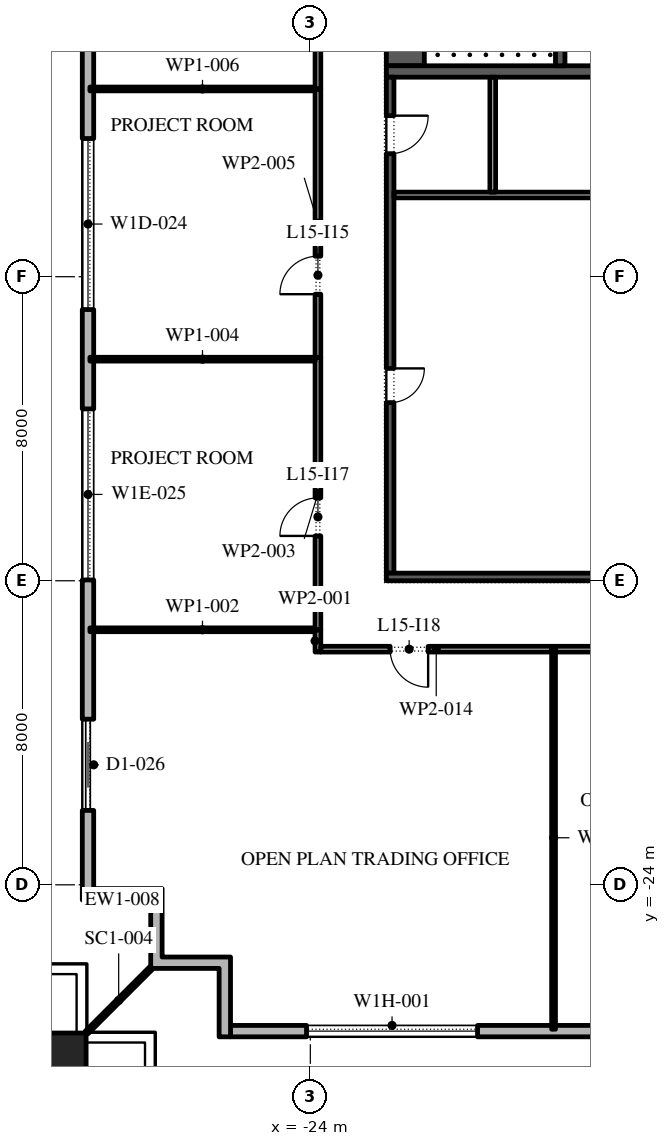
"""IFC4 building model, lengths in metres.
Left out: names, types, materials, properties, quantities, classifications, styles, units other than length and angle.
Written with IfcOpenShell. Run it as: python <this file> out.ifc"""

import sys

from ifc_helpers import new_model, si_unit, direction, frame, frame_2d, origin, origin_2d, place, context, subcontext, project, spatial, polyline, rectangle, outline, extrude, element, fill, save


model = new_model("IFC4")
c1 = context("Model", 3, precision=1e-05, world=origin(), true_north=direction((0.0, 1.0)))
c2 = subcontext(c1, "Body", "Model", "MODEL_VIEW")
j1 = project(units=[si_unit("LENGTHUNIT", "METRE"), si_unit("PLANEANGLEUNIT", "RADIAN")], contexts=[c1])
p1 = place(None, origin())
s1 = spatial("IfcSite", under=j1, at=p1, CompositionType="ELEMENT")
p2 = place(p1, origin())
s2 = spatial("IfcBuilding", under=s1, at=p2, CompositionType="ELEMENT")
p3 = place(p2, frame((0.0, 0.0, 73.2)))
s3 = spatial("IfcBuildingStorey", under=s2, at=p3, CompositionType="ELEMENT", Elevation=73.2)
p4 = place(p3, frame((-30.6, -28.6, 0.0), z_axis=(0.0, 0.0, 1.0), x_axis=(1.0, 0.0, 0.0)))
e1 = element("IfcColumn", 1, at=p4, inside=s3, PredefinedType="COLUMN", context=c2, shape_type="SweptSolid", body=[
    extrude(rectangle(XDim=1.4, YDim=1.4, at=origin_2d()), origin(), (0.0, 0.0, 1.0), 4.2),
])
p5 = place(p3, frame((-26.1, -27.85, 0.0), z_axis=(0.0, 0.0, 1.0), x_axis=(1.0, 0.0, 0.0)))
e2 = element("IfcWall", 2, at=p5, inside=s3, PredefinedType="STANDARD", context=c2, shape_type="SweptSolid", body=[
    extrude(rectangle(XDim=52.5, YDim=0.3, at=frame_2d((26.25, 0.0))), origin(), (0.0, 0.0, 1.0), 4.0),
])
p6 = place(p5, frame((2.0, 0.0, 0.45)))
e3 = element("IfcOpeningElement", 3, at=p6, cuts=e2, PredefinedType="OPENING", context=c2, shape_type="SweptSolid", body=[
    extrude(rectangle(XDim=4.5, YDim=2.75, at=frame_2d((2.25, 1.375))), frame((0.0, 0.16, 0.0), z_axis=(0.0, -1.0, 0.0), x_axis=(1.0, 0.0, 0.0)), (0.0, 0.0, 1.0), 0.32),
])
p7 = place(p5, frame((10.65, 0.0, 0.45)))
e4 = element("IfcOpeningElement", 4, at=p7, cuts=e2, PredefinedType="OPENING", context=c2, shape_type="SweptSolid", body=[
    extrude(rectangle(XDim=4.5, YDim=2.75, at=frame_2d((2.25, 1.375))), frame((0.0, 0.16, 0.0), z_axis=(0.0, -1.0, 0.0), x_axis=(1.0, 0.0, 0.0)), (0.0, 0.0, 1.0), 0.32),
])
p8 = place(p5, frame((20.5, 0.0, 0.0)))
e5 = element("IfcOpeningElement", 5, at=p8, cuts=e2, PredefinedType="OPENING", context=c2, shape_type="SweptSolid", body=[
    extrude(rectangle(XDim=2.4, YDim=3.5, at=frame_2d((1.2, 1.75))), frame((0.0, 0.16, 0.0), z_axis=(0.0, -1.0, 0.0), x_axis=(1.0, 0.0, 0.0)), (0.0, 0.0, 1.0), 0.32),
])
p9 = place(p5, frame((28.25, 0.0, 0.45)))
e6 = element("IfcOpeningElement", 6, at=p9, cuts=e2, PredefinedType="OPENING", context=c2, shape_type="SweptSolid", body=[
    extrude(rectangle(XDim=4.5, YDim=2.75, at=frame_2d((2.25, 1.375))), frame((0.0, 0.16, 0.0), z_axis=(0.0, -1.0, 0.0), x_axis=(1.0, 0.0, 0.0)), (0.0, 0.0, 1.0), 0.32),
])
p10 = place(p5, frame((37.05, 0.0, 0.45)))
e7 = element("IfcOpeningElement", 7, at=p10, cuts=e2, PredefinedType="OPENING", context=c2, shape_type="SweptSolid", body=[
    extrude(rectangle(XDim=4.5, YDim=2.75, at=frame_2d((2.25, 1.375))), frame((0.0, 0.16, 0.0), z_axis=(0.0, -1.0, 0.0), x_axis=(1.0, 0.0, 0.0)), (0.0, 0.0, 1.0), 0.32),
])
p11 = place(p5, frame((45.85, 0.0, 0.45)))
e8 = element("IfcOpeningElement", 8, at=p11, cuts=e2, PredefinedType="OPENING", context=c2, shape_type="SweptSolid", body=[
    extrude(rectangle(XDim=4.5, YDim=2.75, at=frame_2d((2.25, 1.375))), frame((0.0, 0.16, 0.0), z_axis=(0.0, -1.0, 0.0), x_axis=(1.0, 0.0, 0.0)), (0.0, 0.0, 1.0), 0.32),
])
p12 = place(p3, frame((-29.85, 25.1, 0.0), z_axis=(0.0, 0.0, 1.0), x_axis=(0.0, -1.0, 0.0)))
e9 = element("IfcWall", 9, at=p12, inside=s3, PredefinedType="STANDARD", context=c2, shape_type="SweptSolid", body=[
    extrude(rectangle(XDim=49.5, YDim=0.3, at=frame_2d((24.75, 0.0))), origin(), (0.0, 0.0, 1.0), 4.0),
])
p13 = place(p12, frame((1.157, 0.0, 0.45)))
e10 = element("IfcOpeningElement", 10, at=p13, cuts=e9, PredefinedType="OPENING", context=c2, shape_type="SweptSolid", body=[
    extrude(rectangle(XDim=4.5, YDim=2.875, at=frame_2d((2.25, 1.438))), frame((0.0, 0.16, 0.0), z_axis=(0.0, -1.0, 0.0), x_axis=(1.0, 0.0, 0.0)), (0.0, 0.0, 1.0), 0.32),
])
p14 = place(p12, frame((8.121, 0.0, 0.45)))
e11 = element("IfcOpeningElement", 11, at=p14, cuts=e9, PredefinedType="OPENING", context=c2, shape_type="SweptSolid", body=[
    extrude(rectangle(XDim=4.5, YDim=3.05, at=frame_2d((2.25, 1.525))), frame((0.0, 0.16, 0.0), z_axis=(0.0, -1.0, 0.0), x_axis=(1.0, 0.0, 0.0)), (0.0, 0.0, 1.0), 0.32),
])
p15 = place(p12, frame((16.286, 0.0, 0.0)))
e12 = element("IfcOpeningElement", 12, at=p15, cuts=e9, PredefinedType="OPENING", context=c2, shape_type="SweptSolid", body=[
    extrude(rectangle(XDim=2.4, YDim=3.325, at=frame_2d((1.2, 1.663))), frame((0.0, 0.16, 0.0), z_axis=(0.0, -1.0, 0.0), x_axis=(1.0, 0.0, 0.0)), (0.0, 0.0, 1.0), 0.32),
])
p16 = place(p12, frame((22.35, 0.0, 0.45)))
e13 = element("IfcOpeningElement", 13, at=p16, cuts=e9, PredefinedType="OPENING", context=c2, shape_type="SweptSolid", body=[
    extrude(rectangle(XDim=4.5, YDim=2.875, at=frame_2d((2.25, 1.438))), frame((0.0, 0.16, 0.0), z_axis=(0.0, -1.0, 0.0), x_axis=(1.0, 0.0, 0.0)), (0.0, 0.0, 1.0), 0.32),
])
p17 = place(p12, frame((29.464, 0.0, 0.45)))
e14 = element("IfcOpeningElement", 14, at=p17, cuts=e9, PredefinedType="OPENING", context=c2, shape_type="SweptSolid", body=[
    extrude(rectangle(XDim=4.5, YDim=2.875, at=frame_2d((2.25, 1.438))), frame((0.0, 0.16, 0.0), z_axis=(0.0, -1.0, 0.0), x_axis=(1.0, 0.0, 0.0)), (0.0, 0.0, 1.0), 0.32),
])
p18 = place(p12, frame((36.579, 0.0, 0.45)))
e15 = element("IfcOpeningElement", 15, at=p18, cuts=e9, PredefinedType="OPENING", context=c2, shape_type="SweptSolid", body=[
    extrude(rectangle(XDim=4.5, YDim=2.825, at=frame_2d((2.25, 1.413))), frame((0.0, 0.16, 0.0), z_axis=(0.0, -1.0, 0.0), x_axis=(1.0, 0.0, 0.0)), (0.0, 0.0, 1.0), 0.32),
])
p19 = place(p12, frame((44.743, 0.0, 0.0)))
e16 = element("IfcOpeningElement", 16, at=p19, cuts=e9, PredefinedType="OPENING", context=c2, shape_type="SweptSolid", body=[
    extrude(rectangle(XDim=2.4, YDim=3.5, at=frame_2d((1.2, 1.75))), frame((0.0, 0.16, 0.0), z_axis=(0.0, -1.0, 0.0), x_axis=(1.0, 0.0, 0.0)), (0.0, 0.0, 1.0), 0.32),
])
p20 = place(p3, origin())
e17 = element("IfcWall", 17, at=p20, inside=s3, PredefinedType="STANDARD", context=c2, shape_type="SweptSolid", body=[
    extrude(outline(polyline([(-26.4, -26.2), (-28.2, -26.2), (-28.2, -24.4), (-29.7, -24.4), (-29.7, -24.1), (-27.9, -24.1), (-27.9, -25.9), (-26.1, -25.9), (-26.1, -28.0), (-26.4, -28.0), (-26.4, -26.2)])), origin(), (0.0, 0.0, 1.0), 4.0),
])
p21 = place(p3, frame((-28.2, -26.2, -0.05), z_axis=(0.0, 0.0, 1.0), x_axis=(-0.707106781187, -0.707106781187, 0.0)))
e18 = element("IfcWall", 18, at=p21, inside=s3, PredefinedType="STANDARD", context=c2, shape_type="SweptSolid", body=[
    extrude(rectangle(XDim=2.385, YDim=0.1, at=frame_2d((1.192, 0.0))), origin(), (0.0, 0.0, 1.0), 4.05),
])
p22 = place(p3, frame((-21.5, -2.45, 0.0), z_axis=(0.0, 0.0, 1.0), x_axis=(0.0, 1.0, 0.0)))
e19 = element("IfcWall", 19, at=p22, inside=s3, PredefinedType="SHEAR", context=c2, shape_type="SweptSolid", body=[
    extrude(rectangle(XDim=27.9, YDim=1.0, at=frame_2d((13.95, 0.0))), origin(), (0.0, 0.0, 1.0), 4.0),
])
p23 = place(p22, frame((5.05, 0.0, 0.0)))
e20 = element("IfcOpeningElement", 20, at=p23, cuts=e19, PredefinedType="OPENING", context=c2, shape_type="SweptSolid", body=[
    extrude(rectangle(XDim=1.2, YDim=2.1, at=frame_2d((0.6, 1.05))), frame((0.0, 0.51, 0.0), z_axis=(0.0, -1.0, 0.0), x_axis=(1.0, 0.0, 0.0)), (0.0, 0.0, 1.0), 1.02),
])
p24 = place(p22, frame((21.65, 0.0, 0.0)))
e21 = element("IfcOpeningElement", 21, at=p24, cuts=e19, PredefinedType="OPENING", context=c2, shape_type="SweptSolid", body=[
    extrude(rectangle(XDim=1.2, YDim=2.1, at=frame_2d((0.6, 1.05))), frame((0.0, 0.51, 0.0), z_axis=(0.0, -1.0, 0.0), x_axis=(1.0, 0.0, 0.0)), (0.0, 0.0, 1.0), 1.02),
])
p25 = place(p3, frame((-22.0, -2.6, 0.0), z_axis=(0.0, 0.0, 1.0), x_axis=(1.0, 0.0, 0.0)))
e22 = element("IfcWall", 22, at=p25, inside=s3, PredefinedType="SHEAR", context=c2, shape_type="SweptSolid", body=[
    extrude(rectangle(XDim=12.0, YDim=0.3, at=frame_2d((6.0, 0.0))), origin(), (0.0, 0.0, 1.0), 4.0),
])
p26 = place(p3, frame((-17.425, -2.45, 0.0), z_axis=(0.0, 0.0, 1.0), x_axis=(0.0, 1.0, 0.0)))
e23 = element("IfcWall", 23, at=p26, inside=s3, PredefinedType="SHEAR", context=c2, shape_type="SweptSolid", body=[
    extrude(rectangle(XDim=6.3, YDim=0.25, at=frame_2d((3.15, 0.0))), origin(), (0.0, 0.0, 1.0), 4.0),
])
p27 = place(p26, frame((5.05, 0.0, 0.0)))
e24 = element("IfcOpeningElement", 24, at=p27, cuts=e23, PredefinedType="OPENING", context=c2, shape_type="SweptSolid", body=[
    extrude(rectangle(XDim=1.2, YDim=2.1, at=frame_2d((0.6, 1.05))), frame((0.0, 0.135, 0.0), z_axis=(0.0, -1.0, 0.0), x_axis=(1.0, 0.0, 0.0)), (0.0, 0.0, 1.0), 0.27),
])
p28 = place(p3, frame((-21.9, -15.8, 0.0), z_axis=(0.0, 0.0, 1.0), x_axis=(0.0, 1.0, 0.0)))
e25 = element("IfcWall", 25, at=p28, inside=s3, PredefinedType="SHEAR", context=c2, shape_type="SweptSolid", body=[
    extrude(rectangle(XDim=13.05, YDim=0.2, at=frame_2d((6.525, 0.0))), origin(), (0.0, 0.0, 1.0), 4.0),
])
p29 = place(p28, frame((4.488, 0.0, 0.0)))
e26 = element("IfcOpeningElement", 26, at=p29, cuts=e25, PredefinedType="OPENING", context=c2, shape_type="SweptSolid", body=[
    extrude(rectangle(XDim=0.9, YDim=2.1, at=frame_2d((0.45, 1.05))), frame((0.0, 0.11, 0.0), z_axis=(0.0, -1.0, 0.0), x_axis=(1.0, 0.0, 0.0)), (0.0, 0.0, 1.0), 0.22),
])
p30 = place(p28, frame((11.038, 0.0, 0.0)))
e27 = element("IfcOpeningElement", 27, at=p30, cuts=e25, PredefinedType="OPENING", context=c2, shape_type="SweptSolid", body=[
    extrude(rectangle(XDim=1.0, YDim=2.1, at=frame_2d((0.5, 1.05))), frame((0.0, 0.11, 0.0), z_axis=(0.0, -1.0, 0.0), x_axis=(1.0, 0.0, 0.0)), (0.0, 0.0, 1.0), 0.22),
])
p31 = place(p3, frame((-22.0, -15.9, 0.0), z_axis=(0.0, 0.0, 1.0), x_axis=(1.0, 0.0, 0.0)))
e28 = element("IfcWall", 28, at=p31, inside=s3, PredefinedType="SHEAR", context=c2, shape_type="SweptSolid", body=[
    extrude(rectangle(XDim=12.0, YDim=0.2, at=frame_2d((6.0, 0.0))), origin(), (0.0, 0.0, 1.0), 4.0),
])
p32 = place(p3, frame((-21.8, -5.85, 0.0), z_axis=(0.0, 0.0, 1.0), x_axis=(1.0, 0.0, 0.0)))
e29 = element("IfcWall", 29, at=p32, inside=s3, PredefinedType="PARTITIONING", context=c2, shape_type="SweptSolid", body=[
    extrude(rectangle(XDim=5.725, YDim=0.15, at=frame_2d((2.863, 0.0))), origin(), (0.0, 0.0, 1.0), 4.0),
])
p33 = place(p3, frame((-19.2, -5.775, 0.0), z_axis=(0.0, 0.0, 1.0), x_axis=(0.0, 1.0, 0.0)))
e30 = element("IfcWall", 30, at=p33, inside=s3, PredefinedType="PARTITIONING", context=c2, shape_type="SweptSolid", body=[
    extrude(rectangle(XDim=3.025, YDim=0.15, at=frame_2d((1.512, 0.0))), origin(), (0.0, 0.0, 1.0), 4.0),
])
p34 = place(p3, frame((-23.8, -17.875, 0.0), z_axis=(0.0, 0.0, 1.0), x_axis=(0.0, 1.0, 0.0)))
e31 = element("IfcWall", 31, at=p34, inside=s3, PredefinedType="PARTITIONING", context=c2, shape_type="SweptSolid", body=[
    extrude(rectangle(XDim=0.585, YDim=0.15, at=frame_2d((0.292, 0.0))), origin(), (0.0, 0.0, 1.0), 4.0),
])
p35 = place(p3, frame((-23.875, -17.29, 0.0), z_axis=(0.0, 0.0, 1.0), x_axis=(-1.0, 0.0, 0.0)))
e32 = element("IfcWall", 32, at=p35, inside=s3, PredefinedType="PARTITIONING", context=c2, shape_type="SweptSolid", body=[
    extrude(rectangle(XDim=5.925, YDim=0.1, at=frame_2d((2.962, 0.0))), origin(), (0.0, 0.0, 1.0), 4.0),
])
p36 = place(p3, frame((-23.8, -17.29, 0.0), z_axis=(0.0, 0.0, 1.0), x_axis=(0.0, 1.0, 0.0)))
e33 = element("IfcWall", 33, at=p36, inside=s3, PredefinedType="PARTITIONING", context=c2, shape_type="SweptSolid", body=[
    extrude(rectangle(XDim=7.17, YDim=0.15, at=frame_2d((3.585, 0.0))), origin(), (0.0, 0.0, 1.0), 4.0),
])
p37 = place(p36, frame((2.47, 0.0, 0.0)))
e34 = element("IfcOpeningElement", 34, at=p37, cuts=e33, PredefinedType="OPENING", context=c2, shape_type="SweptSolid", body=[
    extrude(rectangle(XDim=1.0, YDim=2.1, at=frame_2d((0.5, 1.05))), frame((0.0, 0.085, 0.0), z_axis=(0.0, -1.0, 0.0), x_axis=(1.0, 0.0, 0.0)), (0.0, 0.0, 1.0), 0.17),
])
p38 = place(p3, frame((-23.875, -10.17, 0.0), z_axis=(0.0, 0.0, 1.0), x_axis=(-1.0, 0.0, 0.0)))
e35 = element("IfcWall", 35, at=p38, inside=s3, PredefinedType="PARTITIONING", context=c2, shape_type="SweptSolid", body=[
    extrude(rectangle(XDim=5.925, YDim=0.1, at=frame_2d((2.962, 0.0))), origin(), (0.0, 0.0, 1.0), 4.0),
])
p39 = place(p3, frame((-23.8, -10.12, 0.0), z_axis=(0.0, 0.0, 1.0), x_axis=(0.0, 1.0, 0.0)))
e36 = element("IfcWall", 36, at=p39, inside=s3, PredefinedType="PARTITIONING", context=c2, shape_type="SweptSolid", body=[
    extrude(rectangle(XDim=7.06, YDim=0.15, at=frame_2d((3.53, 0.0))), origin(), (0.0, 0.0, 1.0), 4.0),
])
p40 = place(p39, frame((1.66, 0.0, 0.0)))
e37 = element("IfcOpeningElement", 37, at=p40, cuts=e36, PredefinedType="OPENING", context=c2, shape_type="SweptSolid", body=[
    extrude(rectangle(XDim=1.0, YDim=2.1, at=frame_2d((0.5, 1.05))), frame((0.0, 0.085, 0.0), z_axis=(0.0, -1.0, 0.0), x_axis=(1.0, 0.0, 0.0)), (0.0, 0.0, 1.0), 0.17),
])
p41 = place(p3, frame((-23.875, -3.06, 0.0), z_axis=(0.0, 0.0, 1.0), x_axis=(-1.0, 0.0, 0.0)))
e38 = element("IfcWall", 38, at=p41, inside=s3, PredefinedType="PARTITIONING", context=c2, shape_type="SweptSolid", body=[
    extrude(rectangle(XDim=5.925, YDim=0.1, at=frame_2d((2.962, 0.0))), origin(), (0.0, 0.0, 1.0), 4.0),
])
p42 = place(p3, frame((-23.8, -3.06, 0.0), z_axis=(0.0, 0.0, 1.0), x_axis=(0.0, 1.0, 0.0)))
e39 = element("IfcWall", 39, at=p42, inside=s3, PredefinedType="PARTITIONING", context=c2, shape_type="SweptSolid", body=[
    extrude(rectangle(XDim=7.12, YDim=0.15, at=frame_2d((3.56, 0.0))), origin(), (0.0, 0.0, 1.0), 4.0),
])
p43 = place(p42, frame((4.47, 0.0, 0.0)))
e40 = element("IfcOpeningElement", 40, at=p43, cuts=e39, PredefinedType="OPENING", context=c2, shape_type="SweptSolid", body=[
    extrude(rectangle(XDim=1.0, YDim=2.1, at=frame_2d((0.5, 1.05))), frame((0.0, 0.085, 0.0), z_axis=(0.0, -1.0, 0.0), x_axis=(1.0, 0.0, 0.0)), (0.0, 0.0, 1.0), 0.17),
])
p44 = place(p3, frame((-17.6, -27.8, 0.0), z_axis=(0.0, 0.0, 1.0), x_axis=(0.0, 1.0, 0.0)))
e41 = element("IfcWall", 41, at=p44, inside=s3, PredefinedType="PARTITIONING", context=c2, shape_type="SweptSolid", body=[
    extrude(rectangle(XDim=10.075, YDim=0.1, at=frame_2d((5.038, 0.0))), origin(), (0.0, 0.0, 1.0), 4.0),
])
p45 = place(p3, frame((-17.65, -17.8, 0.0), z_axis=(0.0, 0.0, 1.0), x_axis=(-1.0, 0.0, 0.0)))
e42 = element("IfcWall", 42, at=p45, inside=s3, PredefinedType="PARTITIONING", context=c2, shape_type="SweptSolid", body=[
    extrude(rectangle(XDim=6.075, YDim=0.15, at=frame_2d((3.038, 0.0))), origin(), (0.0, 0.0, 1.0), 4.0),
])
p46 = place(p45, frame((3.25, 0.0, 0.0)))
e43 = element("IfcOpeningElement", 43, at=p46, cuts=e42, PredefinedType="OPENING", context=c2, shape_type="SweptSolid", body=[
    extrude(rectangle(XDim=1.0, YDim=2.1, at=frame_2d((0.5, 1.05))), frame((0.0, 0.085, 0.0), z_axis=(0.0, -1.0, 0.0), x_axis=(1.0, 0.0, 0.0)), (0.0, 0.0, 1.0), 0.17),
])
p47 = place(p3, frame((-8.85, -17.8, 0.0), z_axis=(0.0, 0.0, 1.0), x_axis=(-1.0, 0.0, 0.0)))
e44 = element("IfcWall", 44, at=p47, inside=s3, PredefinedType="PARTITIONING", context=c2, shape_type="SweptSolid", body=[
    extrude(rectangle(XDim=8.7, YDim=0.15, at=frame_2d((4.35, 0.0))), origin(), (0.0, 0.0, 1.0), 4.0),
])
p48 = place(p47, frame((4.85, 0.0, 0.0)))
e45 = element("IfcOpeningElement", 45, at=p48, cuts=e44, PredefinedType="OPENING", context=c2, shape_type="SweptSolid", body=[
    extrude(rectangle(XDim=1.0, YDim=2.1, at=frame_2d((0.5, 1.05))), frame((0.0, 0.085, 0.0), z_axis=(0.0, -1.0, 0.0), x_axis=(1.0, 0.0, 0.0)), (0.0, 0.0, 1.0), 0.17),
])
p49 = place(p6, origin())
e46 = element("IfcWindow", 46, at=p49, inside=s3, PartitioningType="DOUBLE_PANEL_VERTICAL", PredefinedType="WINDOW", context=c2, shape_type="SweptSolid", body=[
    extrude(rectangle(XDim=4.5, YDim=2.75, at=frame_2d((2.25, 1.375))), frame((0.0, 0.03, 0.0), z_axis=(0.0, -1.0, 0.0), x_axis=(1.0, 0.0, 0.0)), (0.0, 0.0, 1.0), 0.06),
])
fill(e3, e46)
p50 = place(p17, origin())
e47 = element("IfcWindow", 47, at=p50, inside=s3, PartitioningType="DOUBLE_PANEL_VERTICAL", PredefinedType="WINDOW", context=c2, shape_type="SweptSolid", body=[
    extrude(rectangle(XDim=4.5, YDim=2.875, at=frame_2d((2.25, 1.438))), frame((0.0, 0.03, 0.0), z_axis=(0.0, -1.0, 0.0), x_axis=(1.0, 0.0, 0.0)), (0.0, 0.0, 1.0), 0.06),
])
fill(e14, e47)
p51 = place(p18, origin())
e48 = element("IfcWindow", 48, at=p51, inside=s3, PartitioningType="DOUBLE_PANEL_VERTICAL", PredefinedType="WINDOW", context=c2, shape_type="SweptSolid", body=[
    extrude(rectangle(XDim=4.5, YDim=2.825, at=frame_2d((2.25, 1.413))), frame((0.0, 0.03, 0.0), z_axis=(0.0, -1.0, 0.0), x_axis=(1.0, 0.0, 0.0)), (0.0, 0.0, 1.0), 0.06),
])
fill(e15, e48)
p52 = place(p19, origin())
e49 = element("IfcDoor", 49, at=p52, inside=s3, OperationType="DOUBLE_DOOR_SLIDING", PredefinedType="DOOR", context=c2, shape_type="SweptSolid", body=[
    extrude(rectangle(XDim=2.4, YDim=3.5, at=frame_2d((1.2, 1.75))), frame((0.0, 0.025, 0.0), z_axis=(0.0, -1.0, 0.0), x_axis=(1.0, 0.0, 0.0)), (0.0, 0.0, 1.0), 0.05),
])
fill(e16, e49)
p53 = place(p29, frame((0.9, -0.15, 0.0), z_axis=(0.0, 0.0, 1.0), x_axis=(-1.0, 0.0, 0.0)))
e50 = element("IfcDoor", 50, at=p53, inside=s3, OperationType="SINGLE_SWING_RIGHT", PredefinedType="DOOR", context=c2, shape_type="SweptSolid", body=[
    extrude(rectangle(XDim=0.9, YDim=2.1, at=frame_2d((0.45, 1.05))), frame((0.0, -0.05, 0.0), z_axis=(0.0, -1.0, 0.0), x_axis=(1.0, 0.0, 0.0)), (0.0, 0.0, 1.0), 0.05),
])
fill(e26, e50)
p54 = place(p30, frame((1.0, -0.15, 0.0), z_axis=(0.0, 0.0, 1.0), x_axis=(-1.0, 0.0, 0.0)))
e51 = element("IfcDoor", 51, at=p54, inside=s3, OperationType="SINGLE_SWING_RIGHT", PredefinedType="DOOR", context=c2, shape_type="SweptSolid", body=[
    extrude(rectangle(XDim=1.0, YDim=2.1, at=frame_2d((0.5, 1.05))), frame((0.0, -0.05, 0.0), z_axis=(0.0, -1.0, 0.0), x_axis=(1.0, 0.0, 0.0)), (0.0, 0.0, 1.0), 0.05),
])
fill(e27, e51)
p55 = place(p40, origin())
e52 = element("IfcDoor", 52, at=p55, inside=s3, OperationType="SINGLE_SWING_RIGHT", PredefinedType="DOOR", context=c2, shape_type="SweptSolid", body=[
    extrude(rectangle(XDim=1.0, YDim=2.1, at=frame_2d((0.5, 1.05))), frame((0.0, 0.025, 0.0), z_axis=(0.0, -1.0, 0.0), x_axis=(1.0, 0.0, 0.0)), (0.0, 0.0, 1.0), 0.05),
])
fill(e37, e52)
p56 = place(p37, origin())
e53 = element("IfcDoor", 53, at=p56, inside=s3, OperationType="SINGLE_SWING_RIGHT", PredefinedType="DOOR", context=c2, shape_type="SweptSolid", body=[
    extrude(rectangle(XDim=1.0, YDim=2.1, at=frame_2d((0.5, 1.05))), frame((0.0, 0.025, 0.0), z_axis=(0.0, -1.0, 0.0), x_axis=(1.0, 0.0, 0.0)), (0.0, 0.0, 1.0), 0.05),
])
fill(e34, e53)
p57 = place(p46, origin())
e54 = element("IfcDoor", 54, at=p57, inside=s3, OperationType="SINGLE_SWING_RIGHT", PredefinedType="DOOR", context=c2, shape_type="SweptSolid", body=[
    extrude(rectangle(XDim=1.0, YDim=2.1, at=frame_2d((0.5, 1.05))), frame((0.0, 0.025, 0.0), z_axis=(0.0, -1.0, 0.0), x_axis=(1.0, 0.0, 0.0)), (0.0, 0.0, 1.0), 0.05),
])
fill(e43, e54)
save(model, sys.argv[1])
